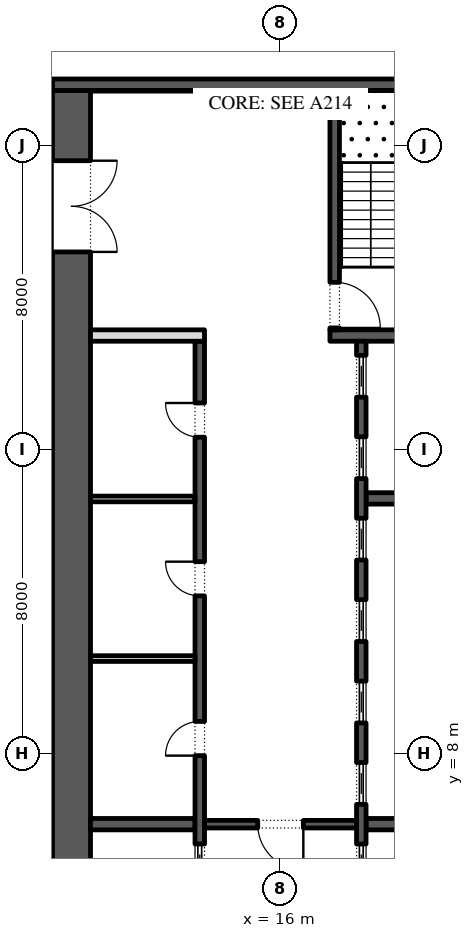
"""IFC4 building model, lengths in metres.
Left out: names, types, materials, properties, quantities, classifications, styles, units other than length and angle.
Written with IfcOpenShell. Run it as: python <this file> out.ifc"""

import sys

from ifc_helpers import new_model, si_unit, direction, frame, frame_2d, origin, place, context, subcontext, project, spatial, rectangle, extrude, element, fill, save


model = new_model("IFC4")
c1 = context("Model", 3, precision=1e-05, world=origin(), true_north=direction((0.0, 1.0)))
c2 = subcontext(c1, "Body", "Model", "MODEL_VIEW")
j1 = project(units=[si_unit("LENGTHUNIT", "METRE"), si_unit("PLANEANGLEUNIT", "RADIAN")], contexts=[c1])
p1 = place(None, origin())
s1 = spatial("IfcSite", under=j1, at=p1, CompositionType="ELEMENT")
p2 = place(p1, origin())
s2 = spatial("IfcBuilding", under=s1, at=p2, CompositionType="ELEMENT")
p3 = place(p2, frame((0.0, 0.0, 56.4)))
s3 = spatial("IfcBuildingStorey", under=s2, at=p3, CompositionType="ELEMENT", Elevation=56.4)
p4 = place(p3, frame((10.5, -2.45, 0.0), z_axis=(0.0, 0.0, 1.0), x_axis=(0.0, 1.0, 0.0)))
e1 = element("IfcWall", 1, at=p4, inside=s3, PredefinedType="SHEAR", context=c2, shape_type="SweptSolid", body=[
    extrude(rectangle(XDim=27.9, YDim=1.0, at=frame_2d((13.95, 0.0))), origin(), (0.0, 0.0, 1.0), 4.0),
])
p5 = place(p4, frame((23.65, 0.0, 0.0)))
e2 = element("IfcOpeningElement", 2, at=p5, cuts=e1, PredefinedType="OPENING", context=c2, shape_type="SweptSolid", body=[
    extrude(rectangle(XDim=2.4, YDim=2.1, at=frame_2d((1.2, 1.05))), frame((0.0, 0.51, 0.0), z_axis=(0.0, -1.0, 0.0), x_axis=(1.0, 0.0, 0.0)), (0.0, 0.0, 1.0), 1.02),
])
p6 = place(p4, frame((0.788, 0.0, 0.0)))
e3 = element("IfcOpeningElement", 3, at=p6, cuts=e1, PredefinedType="OPENING", context=c2, shape_type="SweptSolid", body=[
    extrude(rectangle(XDim=0.9, YDim=2.1, at=frame_2d((0.45, 1.05))), frame((0.0, 0.51, 0.0), z_axis=(0.0, -1.0, 0.0), x_axis=(1.0, 0.0, 0.0)), (0.0, 0.0, 1.0), 1.02),
])
p7 = place(p4, frame((4.012, 0.0, 0.0)))
e4 = element("IfcOpeningElement", 4, at=p7, cuts=e1, PredefinedType="OPENING", context=c2, shape_type="SweptSolid", body=[
    extrude(rectangle(XDim=0.9, YDim=2.1, at=frame_2d((0.45, 1.05))), frame((0.0, 0.51, 0.0), z_axis=(0.0, -1.0, 0.0), x_axis=(1.0, 0.0, 0.0)), (0.0, 0.0, 1.0), 1.02),
])
p8 = place(p3, frame((10.0, 25.6, 0.0), z_axis=(0.0, 0.0, 1.0), x_axis=(1.0, 0.0, 0.0)))
e5 = element("IfcWall", 5, at=p8, inside=s3, PredefinedType="SHEAR", context=c2, shape_type="SweptSolid", body=[
    extrude(rectangle(XDim=12.0, YDim=0.3, at=frame_2d((6.0, 0.0))), origin(), (0.0, 0.0, 1.0), 4.0),
])
p9 = place(p3, frame((17.3, 19.0, 0.0), z_axis=(0.0, 0.0, 1.0), x_axis=(1.0, 0.0, 0.0)))
e6 = element("IfcWall", 6, at=p9, inside=s3, PredefinedType="SHEAR", context=c2, shape_type="SweptSolid", body=[
    extrude(rectangle(XDim=3.7, YDim=0.3, at=frame_2d((1.85, 0.0))), origin(), (0.0, 0.0, 1.0), 4.0),
])
p10 = place(p3, frame((17.425, 19.15, 0.0), z_axis=(0.0, 0.0, 1.0), x_axis=(0.0, 1.0, 0.0)))
e7 = element("IfcWall", 7, at=p10, inside=s3, PredefinedType="SHEAR", context=c2, shape_type="SweptSolid", body=[
    extrude(rectangle(XDim=6.3, YDim=0.25, at=frame_2d((3.15, 0.0))), origin(), (0.0, 0.0, 1.0), 4.0),
])
p11 = place(p10, frame((0.05, 0.0, 0.0)))
e8 = element("IfcOpeningElement", 8, at=p11, cuts=e7, PredefinedType="OPENING", context=c2, shape_type="SweptSolid", body=[
    extrude(rectangle(XDim=1.2, YDim=2.1, at=frame_2d((0.6, 1.05))), frame((0.0, 0.135, 0.0), z_axis=(0.0, -1.0, 0.0), x_axis=(1.0, 0.0, 0.0)), (0.0, 0.0, 1.0), 0.27),
])
for number, where, z_axis, x_axis in (
    (9, (18.25, 6.143, 0.0), (0.0, 0.0, 1.0), (1.0, 0.0, 0.0)),
    (10, (18.25, 14.714, 0.0), (0.0, 0.0, 1.0), (1.0, 0.0, 0.0)),
):
    element("IfcWall", number, at=place(p3, frame(where, z_axis=z_axis, x_axis=x_axis)), inside=s3, PredefinedType="SHEAR", context=c2, shape_type="SweptSolid", body=[
        extrude(rectangle(XDim=2.75, YDim=0.3, at=frame_2d((1.375, 0.0))), origin(), (0.0, 0.0, 1.0), 4.0),
    ])
p12 = place(p3, frame((18.125, 4.15, 0.0), z_axis=(0.0, 0.0, 1.0), x_axis=(0.0, 1.0, 0.0)))
e11 = element("IfcWall", 11, at=p12, inside=s3, PredefinedType="SHEAR", context=c2, shape_type="SweptSolid", body=[
    extrude(rectangle(XDim=14.7, YDim=0.25, at=frame_2d((7.35, 0.0))), origin(), (0.0, 0.0, 1.0), 4.0),
])
p13 = place(p12, frame((0.371, 0.0, 0.0)))
e12 = element("IfcOpeningElement", 12, at=p13, cuts=e11, PredefinedType="OPENING", context=c2, shape_type="SweptSolid", body=[
    extrude(rectangle(XDim=1.1, YDim=2.1, at=frame_2d((0.55, 1.05))), frame((0.0, 0.135, 0.0), z_axis=(0.0, -1.0, 0.0), x_axis=(1.0, 0.0, 0.0)), (0.0, 0.0, 1.0), 0.27),
])
p14 = place(p12, frame((2.514, 0.0, 0.0)))
e13 = element("IfcOpeningElement", 13, at=p14, cuts=e11, PredefinedType="OPENING", context=c2, shape_type="SweptSolid", body=[
    extrude(rectangle(XDim=1.1, YDim=2.1, at=frame_2d((0.55, 1.05))), frame((0.0, 0.135, 0.0), z_axis=(0.0, -1.0, 0.0), x_axis=(1.0, 0.0, 0.0)), (0.0, 0.0, 1.0), 0.27),
])
p15 = place(p12, frame((4.657, 0.0, 0.0)))
e14 = element("IfcOpeningElement", 14, at=p15, cuts=e11, PredefinedType="OPENING", context=c2, shape_type="SweptSolid", body=[
    extrude(rectangle(XDim=1.1, YDim=2.1, at=frame_2d((0.55, 1.05))), frame((0.0, 0.135, 0.0), z_axis=(0.0, -1.0, 0.0), x_axis=(1.0, 0.0, 0.0)), (0.0, 0.0, 1.0), 0.27),
])
p16 = place(p12, frame((6.8, 0.0, 0.0)))
e15 = element("IfcOpeningElement", 15, at=p16, cuts=e11, PredefinedType="OPENING", context=c2, shape_type="SweptSolid", body=[
    extrude(rectangle(XDim=1.1, YDim=2.1, at=frame_2d((0.55, 1.05))), frame((0.0, 0.135, 0.0), z_axis=(0.0, -1.0, 0.0), x_axis=(1.0, 0.0, 0.0)), (0.0, 0.0, 1.0), 0.27),
])
p17 = place(p12, frame((8.943, 0.0, 0.0)))
e16 = element("IfcOpeningElement", 16, at=p17, cuts=e11, PredefinedType="OPENING", context=c2, shape_type="SweptSolid", body=[
    extrude(rectangle(XDim=1.1, YDim=2.1, at=frame_2d((0.55, 1.05))), frame((0.0, 0.135, 0.0), z_axis=(0.0, -1.0, 0.0), x_axis=(1.0, 0.0, 0.0)), (0.0, 0.0, 1.0), 0.27),
])
p18 = place(p12, frame((11.086, 0.0, 0.0)))
e17 = element("IfcOpeningElement", 17, at=p18, cuts=e11, PredefinedType="OPENING", context=c2, shape_type="SweptSolid", body=[
    extrude(rectangle(XDim=1.1, YDim=2.1, at=frame_2d((0.55, 1.05))), frame((0.0, 0.135, 0.0), z_axis=(0.0, -1.0, 0.0), x_axis=(1.0, 0.0, 0.0)), (0.0, 0.0, 1.0), 0.27),
])
p19 = place(p12, frame((13.229, 0.0, 0.0)))
e18 = element("IfcOpeningElement", 18, at=p19, cuts=e11, PredefinedType="OPENING", context=c2, shape_type="SweptSolid", body=[
    extrude(rectangle(XDim=1.1, YDim=2.1, at=frame_2d((0.55, 1.05))), frame((0.0, 0.135, 0.0), z_axis=(0.0, -1.0, 0.0), x_axis=(1.0, 0.0, 0.0)), (0.0, 0.0, 1.0), 0.27),
])
p20 = place(p3, frame((11.0, 6.143, 0.0), z_axis=(0.0, 0.0, 1.0), x_axis=(1.0, 0.0, 0.0)))
e19 = element("IfcWall", 19, at=p20, inside=s3, PredefinedType="SHEAR", context=c2, shape_type="SweptSolid", body=[
    extrude(rectangle(XDim=2.75, YDim=0.3, at=frame_2d((1.375, 0.0))), origin(), (0.0, 0.0, 1.0), 4.0),
])
p21 = place(p3, frame((13.875, -2.45, 0.0), z_axis=(0.0, 0.0, 1.0), x_axis=(0.0, 1.0, 0.0)))
e20 = element("IfcWall", 20, at=p21, inside=s3, PredefinedType="SHEAR", context=c2, shape_type="SweptSolid", body=[
    extrude(rectangle(XDim=21.3, YDim=0.25, at=frame_2d((10.65, 0.0))), origin(), (0.0, 0.0, 1.0), 4.0),
])
p22 = place(p21, frame((10.396, 0.0, 0.0)))
e21 = element("IfcOpeningElement", 21, at=p22, cuts=e20, PredefinedType="OPENING", context=c2, shape_type="SweptSolid", body=[
    extrude(rectangle(XDim=0.9, YDim=2.1, at=frame_2d((0.45, 1.05))), frame((0.0, 0.135, 0.0), z_axis=(0.0, -1.0, 0.0), x_axis=(1.0, 0.0, 0.0)), (0.0, 0.0, 1.0), 0.27),
])
p23 = place(p21, frame((14.6, 0.0, 0.0)))
e22 = element("IfcOpeningElement", 22, at=p23, cuts=e20, PredefinedType="OPENING", context=c2, shape_type="SweptSolid", body=[
    extrude(rectangle(XDim=0.9, YDim=2.1, at=frame_2d((0.45, 1.05))), frame((0.0, 0.135, 0.0), z_axis=(0.0, -1.0, 0.0), x_axis=(1.0, 0.0, 0.0)), (0.0, 0.0, 1.0), 0.27),
])
p24 = place(p21, frame((18.775, 0.0, 0.0)))
e23 = element("IfcOpeningElement", 23, at=p24, cuts=e20, PredefinedType="OPENING", context=c2, shape_type="SweptSolid", body=[
    extrude(rectangle(XDim=0.9, YDim=2.1, at=frame_2d((0.45, 1.05))), frame((0.0, 0.135, 0.0), z_axis=(0.0, -1.0, 0.0), x_axis=(1.0, 0.0, 0.0)), (0.0, 0.0, 1.0), 0.27),
])
p25 = place(p21, frame((6.971, 0.0, 0.0)))
e24 = element("IfcOpeningElement", 24, at=p25, cuts=e20, PredefinedType="OPENING", context=c2, shape_type="SweptSolid", body=[
    extrude(rectangle(XDim=1.1, YDim=2.1, at=frame_2d((0.55, 1.05))), frame((0.0, 0.135, 0.0), z_axis=(0.0, -1.0, 0.0), x_axis=(1.0, 0.0, 0.0)), (0.0, 0.0, 1.0), 0.27),
])
p26 = place(p3, frame((11.0, 19.0, 0.0), z_axis=(0.0, 0.0, 1.0), x_axis=(1.0, 0.0, 0.0)))
e25 = element("IfcWall", 25, at=p26, inside=s3, PredefinedType="PARTITIONING", context=c2, shape_type="SweptSolid", body=[
    extrude(rectangle(XDim=3.0, YDim=0.3, at=frame_2d((1.5, 0.0))), origin(), (0.0, 0.0, 1.0), 4.0),
])
for number, where, z_axis, x_axis in (
    (26, (11.0, 10.5, 0.0), (0.0, 0.0, 1.0), (1.0, 0.0, 0.0)),
    (27, (11.0, 14.7, 0.0), (0.0, 0.0, 1.0), (1.0, 0.0, 0.0)),
):
    element("IfcWall", number, at=place(p3, frame(where, z_axis=z_axis, x_axis=x_axis)), inside=s3, PredefinedType="PARTITIONING", context=c2, shape_type="SweptSolid", body=[
        extrude(rectangle(XDim=2.75, YDim=0.15, at=frame_2d((1.375, 0.0))), origin(), (0.0, 0.0, 1.0), 4.0),
    ])
p27 = place(p3, frame((14.0, 6.143, 0.0), z_axis=(0.0, 0.0, 1.0), x_axis=(1.0, 0.0, 0.0)))
e28 = element("IfcWall", 28, at=p27, inside=s3, PredefinedType="SHEAR", context=c2, shape_type="SweptSolid", body=[
    extrude(rectangle(XDim=4.0, YDim=0.2, at=frame_2d((2.0, 0.0))), origin(), (0.0, 0.0, 1.0), 4.0),
])
p28 = place(p27, frame((1.4, 0.0, 0.0)))
e29 = element("IfcOpeningElement", 29, at=p28, cuts=e28, PredefinedType="OPENING", context=c2, shape_type="SweptSolid", body=[
    extrude(rectangle(XDim=1.2, YDim=2.1, at=frame_2d((0.6, 1.05))), frame((0.0, 0.11, 0.0), z_axis=(0.0, -1.0, 0.0), x_axis=(1.0, 0.0, 0.0)), (0.0, 0.0, 1.0), 0.22),
])
p29 = place(p13, origin())
e30 = element("IfcDoor", 30, at=p29, inside=s3, OperationType="SLIDING_TO_LEFT", PredefinedType="DOOR", context=c2, shape_type="SweptSolid", body=[
    extrude(rectangle(XDim=1.1, YDim=2.1, at=frame_2d((0.55, 1.05))), frame((0.0, 0.025, 0.0), z_axis=(0.0, -1.0, 0.0), x_axis=(1.0, 0.0, 0.0)), (0.0, 0.0, 1.0), 0.05),
])
fill(e12, e30)
p30 = place(p14, origin())
e31 = element("IfcDoor", 31, at=p30, inside=s3, OperationType="SLIDING_TO_LEFT", PredefinedType="DOOR", context=c2, shape_type="SweptSolid", body=[
    extrude(rectangle(XDim=1.1, YDim=2.1, at=frame_2d((0.55, 1.05))), frame((0.0, 0.025, 0.0), z_axis=(0.0, -1.0, 0.0), x_axis=(1.0, 0.0, 0.0)), (0.0, 0.0, 1.0), 0.05),
])
fill(e13, e31)
p31 = place(p15, origin())
e32 = element("IfcDoor", 32, at=p31, inside=s3, OperationType="SLIDING_TO_LEFT", PredefinedType="DOOR", context=c2, shape_type="SweptSolid", body=[
    extrude(rectangle(XDim=1.1, YDim=2.1, at=frame_2d((0.55, 1.05))), frame((0.0, 0.025, 0.0), z_axis=(0.0, -1.0, 0.0), x_axis=(1.0, 0.0, 0.0)), (0.0, 0.0, 1.0), 0.05),
])
fill(e14, e32)
p32 = place(p16, origin())
e33 = element("IfcDoor", 33, at=p32, inside=s3, OperationType="SLIDING_TO_LEFT", PredefinedType="DOOR", context=c2, shape_type="SweptSolid", body=[
    extrude(rectangle(XDim=1.1, YDim=2.1, at=frame_2d((0.55, 1.05))), frame((0.0, 0.025, 0.0), z_axis=(0.0, -1.0, 0.0), x_axis=(1.0, 0.0, 0.0)), (0.0, 0.0, 1.0), 0.05),
])
fill(e15, e33)
p33 = place(p17, origin())
e34 = element("IfcDoor", 34, at=p33, inside=s3, OperationType="SLIDING_TO_LEFT", PredefinedType="DOOR", context=c2, shape_type="SweptSolid", body=[
    extrude(rectangle(XDim=1.1, YDim=2.1, at=frame_2d((0.55, 1.05))), frame((0.0, 0.025, 0.0), z_axis=(0.0, -1.0, 0.0), x_axis=(1.0, 0.0, 0.0)), (0.0, 0.0, 1.0), 0.05),
])
fill(e16, e34)
p34 = place(p18, origin())
e35 = element("IfcDoor", 35, at=p34, inside=s3, OperationType="SLIDING_TO_LEFT", PredefinedType="DOOR", context=c2, shape_type="SweptSolid", body=[
    extrude(rectangle(XDim=1.1, YDim=2.1, at=frame_2d((0.55, 1.05))), frame((0.0, 0.025, 0.0), z_axis=(0.0, -1.0, 0.0), x_axis=(1.0, 0.0, 0.0)), (0.0, 0.0, 1.0), 0.05),
])
fill(e17, e35)
p35 = place(p19, origin())
e36 = element("IfcDoor", 36, at=p35, inside=s3, OperationType="SLIDING_TO_LEFT", PredefinedType="DOOR", context=c2, shape_type="SweptSolid", body=[
    extrude(rectangle(XDim=1.1, YDim=2.1, at=frame_2d((0.55, 1.05))), frame((0.0, 0.025, 0.0), z_axis=(0.0, -1.0, 0.0), x_axis=(1.0, 0.0, 0.0)), (0.0, 0.0, 1.0), 0.05),
])
fill(e18, e36)
p36 = place(p22, origin())
e37 = element("IfcDoor", 37, at=p36, inside=s3, OperationType="SINGLE_SWING_RIGHT", PredefinedType="DOOR", context=c2, shape_type="SweptSolid", body=[
    extrude(rectangle(XDim=0.9, YDim=2.1, at=frame_2d((0.45, 1.05))), frame((0.0, 0.125, 0.0), z_axis=(0.0, -1.0, 0.0), x_axis=(1.0, 0.0, 0.0)), (0.0, 0.0, 1.0), 0.05),
])
fill(e21, e37)
p37 = place(p23, origin())
e38 = element("IfcDoor", 38, at=p37, inside=s3, OperationType="SINGLE_SWING_LEFT", PredefinedType="DOOR", context=c2, shape_type="SweptSolid", body=[
    extrude(rectangle(XDim=0.9, YDim=2.1, at=frame_2d((0.45, 1.05))), frame((0.0, 0.125, 0.0), z_axis=(0.0, -1.0, 0.0), x_axis=(1.0, 0.0, 0.0)), (0.0, 0.0, 1.0), 0.05),
])
fill(e22, e38)
p38 = place(p24, origin())
e39 = element("IfcDoor", 39, at=p38, inside=s3, OperationType="SINGLE_SWING_LEFT", PredefinedType="DOOR", context=c2, shape_type="SweptSolid", body=[
    extrude(rectangle(XDim=0.9, YDim=2.1, at=frame_2d((0.45, 1.05))), frame((0.0, 0.125, 0.0), z_axis=(0.0, -1.0, 0.0), x_axis=(1.0, 0.0, 0.0)), (0.0, 0.0, 1.0), 0.05),
])
fill(e23, e39)
p39 = place(p25, origin())
e40 = element("IfcDoor", 40, at=p39, inside=s3, OperationType="SLIDING_TO_LEFT", PredefinedType="DOOR", context=c2, shape_type="SweptSolid", body=[
    extrude(rectangle(XDim=1.1, YDim=2.1, at=frame_2d((0.55, 1.05))), frame((0.0, 0.025, 0.0), z_axis=(0.0, -1.0, 0.0), x_axis=(1.0, 0.0, 0.0)), (0.0, 0.0, 1.0), 0.05),
])
fill(e24, e40)
p40 = place(p28, frame((1.2, 0.0, 0.0), z_axis=(0.0, 0.0, 1.0), x_axis=(-1.0, 0.0, 0.0)))
e41 = element("IfcDoor", 41, at=p40, inside=s3, OperationType="SINGLE_SWING_RIGHT", PredefinedType="DOOR", context=c2, shape_type="SweptSolid", body=[
    extrude(rectangle(XDim=1.2, YDim=2.1, at=frame_2d((0.6, 1.05))), frame((0.0, 0.025, 0.0), z_axis=(0.0, -1.0, 0.0), x_axis=(1.0, 0.0, 0.0)), (0.0, 0.0, 1.0), 0.05),
])
fill(e29, e41)
p41 = place(p5, frame((2.4, 0.0, 0.0), z_axis=(0.0, 0.0, 1.0), x_axis=(-1.0, 0.0, 0.0)))
e42 = element("IfcDoor", 42, at=p41, inside=s3, OperationType="DOUBLE_DOOR_SINGLE_SWING", PredefinedType="DOOR", context=c2, shape_type="SweptSolid", body=[
    extrude(rectangle(XDim=2.4, YDim=2.1, at=frame_2d((1.2, 1.05))), frame((0.0, 0.025, 0.0), z_axis=(0.0, -1.0, 0.0), x_axis=(1.0, 0.0, 0.0)), (0.0, 0.0, 1.0), 0.05),
])
fill(e2, e42)
p42 = place(p11, frame((1.2, 0.0, 0.0), z_axis=(0.0, 0.0, 1.0), x_axis=(-1.0, 0.0, 0.0)))
e43 = element("IfcDoor", 43, at=p42, inside=s3, OperationType="SINGLE_SWING_LEFT", PredefinedType="DOOR", context=c2, shape_type="SweptSolid", body=[
    extrude(rectangle(XDim=1.2, YDim=2.1, at=frame_2d((0.6, 1.05))), frame((0.0, 0.025, 0.0), z_axis=(0.0, -1.0, 0.0), x_axis=(1.0, 0.0, 0.0)), (0.0, 0.0, 1.0), 0.05),
])
fill(e8, e43)
save(model, sys.argv[1])
